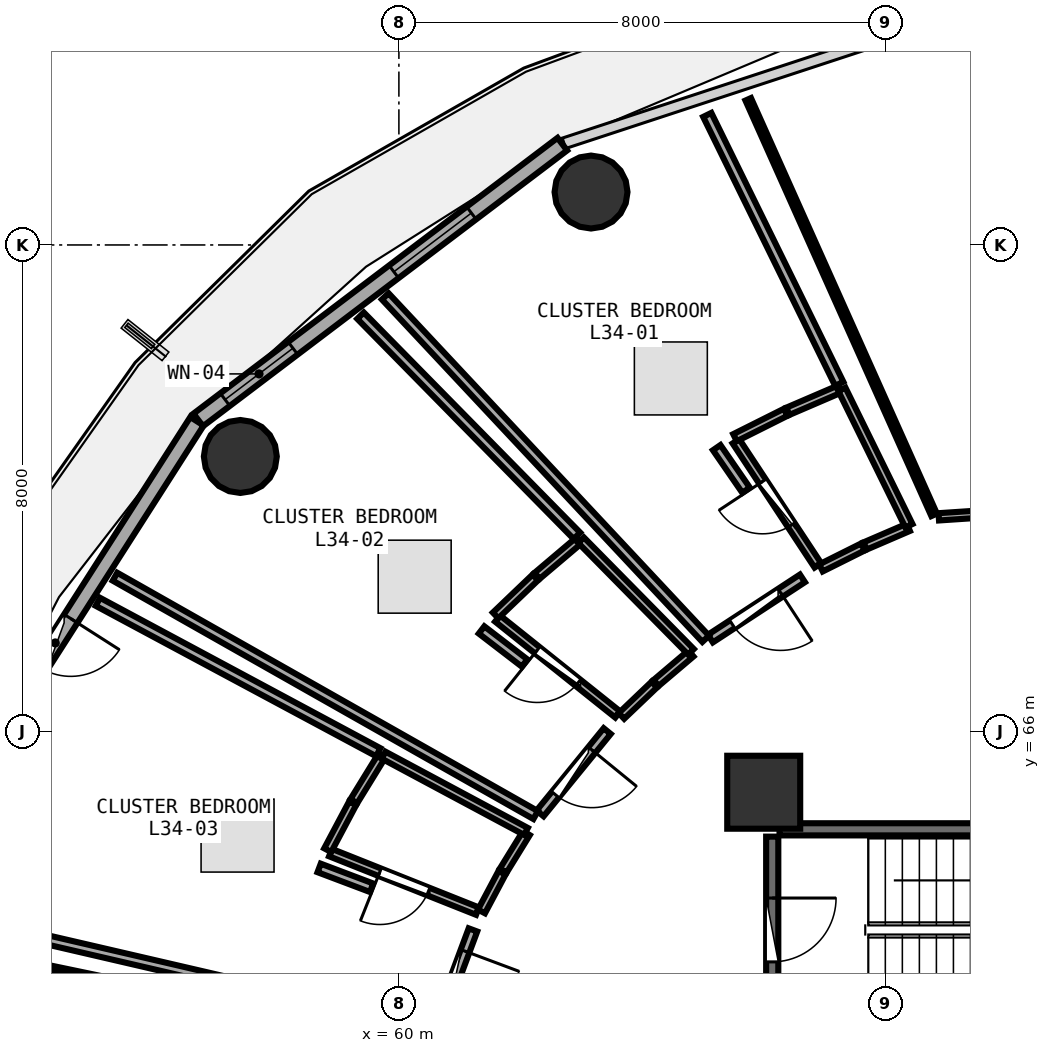
"""IFC4 building model, lengths in metres.
Left out: names, types, materials, properties, quantities, classifications, styles, units other than length and angle.
Written with IfcOpenShell. Run it as: python <this file> out.ifc"""

import sys

from ifc_helpers import new_model, si_unit, direction, frame, frame_2d, origin, origin_2d, place, context, subcontext, project, spatial, rectangle, circle, extrude, element, fill, save


model = new_model("IFC4")
c1 = context("Model", 3, precision=1e-05, world=origin(), true_north=direction((0.0, 1.0)))
c2 = subcontext(c1, "Body", "Model", "MODEL_VIEW")
j1 = project(units=[si_unit("LENGTHUNIT", "METRE"), si_unit("PLANEANGLEUNIT", "RADIAN")], contexts=[c1])
p1 = place(None, origin())
s1 = spatial("IfcSite", under=j1, at=p1, CompositionType="ELEMENT")
p2 = place(p1, origin())
s2 = spatial("IfcBuilding", under=s1, at=p2, CompositionType="ELEMENT")
p3 = place(p2, frame((0.0, 0.0, 135.6)))
s3 = spatial("IfcBuildingStorey", under=s2, at=p3, CompositionType="ELEMENT", Elevation=135.6)
p4 = place(p3, frame((66.0, 65.0, 0.0), z_axis=(0.0, 0.0, 1.0), x_axis=(1.0, 0.0, 0.0)))
e1 = element("IfcColumn", 1, at=p4, inside=s3, PredefinedType="PILASTER", context=c2, shape_type="SweptSolid", body=[
    extrude(rectangle(XDim=1.2, YDim=1.2, at=origin_2d()), origin(), (0.0, 0.0, 1.0), 3.75),
])
for number, where, z_axis, x_axis in (
    (2, (63.16, 74.87, 0.0), (0.0, 0.0, 1.0), (1.0, 0.0, 0.0)),
    (3, (57.392, 70.521, 0.0), (0.0, 0.0, 1.0), (1.0, 0.0, 0.0)),
):
    element("IfcColumn", number, at=place(p3, frame(where, z_axis=z_axis, x_axis=x_axis)), inside=s3, PredefinedType="COLUMN", context=c2, shape_type="SweptSolid", body=[
        extrude(circle(Radius=0.6, at=origin_2d()), origin(), (0.0, 0.0, 1.0), 3.75),
    ])
p5 = place(p3, frame((62.688, 75.658, 0.0), z_axis=(0.0, 0.0, 1.0), x_axis=(-0.797163719609, -0.603763202042, 0.0)))
e4 = element("IfcWall", 4, at=p5, inside=s3, PredefinedType="SOLIDWALL", context=c2, shape_type="SweptSolid", body=[
    extrude(rectangle(XDim=7.512, YDim=0.26, at=frame_2d((3.756, 0.0))), origin(), (0.0, 0.0, 1.0), 3.475),
])
p6 = place(p5, frame((1.876, 0.0, 0.85)))
e5 = element("IfcOpeningElement", 5, at=p6, cuts=e4, PredefinedType="OPENING", context=c2, shape_type="SweptSolid", body=[
    extrude(rectangle(XDim=1.6, YDim=1.45, at=frame_2d((0.8, 0.725))), frame((0.0, 0.14, 0.0), z_axis=(0.0, -1.0, 0.0), x_axis=(1.0, 0.0, 0.0)), (0.0, 0.0, 1.0), 0.28),
])
p7 = place(p5, frame((5.558, 0.0, 0.85)))
e6 = element("IfcOpeningElement", 6, at=p7, cuts=e4, PredefinedType="OPENING", context=c2, shape_type="SweptSolid", body=[
    extrude(rectangle(XDim=1.4, YDim=1.45, at=frame_2d((0.7, 0.725))), frame((0.0, 0.14, 0.0), z_axis=(0.0, -1.0, 0.0), x_axis=(1.0, 0.0, 0.0)), (0.0, 0.0, 1.0), 0.28),
])
p8 = place(p3, frame((56.679, 71.1, 0.0), z_axis=(0.0, 0.0, 1.0), x_axis=(-0.538801521808, -0.842432739213, 0.0)))
e7 = element("IfcWall", 7, at=p8, inside=s3, PredefinedType="SOLIDWALL", context=c2, shape_type="SweptSolid", body=[
    extrude(rectangle(XDim=7.253, YDim=0.26, at=frame_2d((3.627, 0.0))), origin(), (0.0, 0.0, 1.0), 3.475),
])
p9 = place(p8, frame((3.852, 0.0, 0.0)))
e8 = element("IfcOpeningElement", 8, at=p9, cuts=e7, PredefinedType="OPENING", context=c2, shape_type="SweptSolid", body=[
    extrude(rectangle(XDim=0.95, YDim=2.1, at=frame_2d((0.475, 1.05))), frame((0.0, 0.14, 0.0), z_axis=(0.0, -1.0, 0.0), x_axis=(1.0, 0.0, 0.0)), (0.0, 0.0, 1.0), 0.28),
])
p10 = place(p8, frame((5.152, 0.0, 0.85)))
e9 = element("IfcOpeningElement", 9, at=p10, cuts=e7, PredefinedType="OPENING", context=c2, shape_type="SweptSolid", body=[
    extrude(rectangle(XDim=1.2, YDim=1.45, at=frame_2d((0.6, 0.725))), frame((0.0, 0.14, 0.0), z_axis=(0.0, -1.0, 0.0), x_axis=(1.0, 0.0, 0.0)), (0.0, 0.0, 1.0), 0.28),
])
p11 = place(p3, frame((73.42, 64.39, 0.0), z_axis=(0.0, 0.0, 1.0), x_axis=(-1.0, 0.0, 0.0)))
e10 = element("IfcWall", 10, at=p11, inside=s3, PredefinedType="SHEAR", context=c2, shape_type="SweptSolid", body=[
    extrude(rectangle(XDim=7.16, YDim=0.2, at=frame_2d((3.58, 0.0))), origin(), (0.0, 0.0, 1.0), 3.49),
])
p12 = place(p3, frame((66.14, 64.27, 0.0), z_axis=(0.0, 0.0, 1.0), x_axis=(0.0, -1.0, 0.0)))
e11 = element("IfcWall", 11, at=p12, inside=s3, PredefinedType="SHEAR", context=c2, shape_type="SweptSolid", body=[
    extrude(rectangle(XDim=3.07, YDim=0.2, at=frame_2d((1.535, 0.0))), origin(), (0.0, 0.0, 1.0), 3.49),
])
p13 = place(p12, frame((1.01, 0.0, 0.0)))
e12 = element("IfcOpeningElement", 12, at=p13, cuts=e11, PredefinedType="OPENING", context=c2, shape_type="SweptSolid", body=[
    extrude(rectangle(XDim=1.05, YDim=2.1, at=frame_2d((0.525, 1.05))), frame((0.0, 0.11, 0.0), z_axis=(0.0, -1.0, 0.0), x_axis=(1.0, 0.0, 0.0)), (0.0, 0.0, 1.0), 0.22),
])
p14 = place(p3, frame((77.169, 70.083, 0.0), z_axis=(0.0, 0.0, 1.0), x_axis=(-0.997775005058, -0.066671127793, 0.0)))
e13 = element("IfcWall", 13, at=p14, inside=s3, PredefinedType="PARTITIONING", context=c2, shape_type="SweptSolid", body=[
    extrude(rectangle(XDim=8.309, YDim=0.12, at=frame_2d((4.154, 0.0))), origin(), (0.0, 0.0, 1.0), 2.975),
])
p15 = place(p14, frame((3.704, 0.0, 0.0)))
e14 = element("IfcOpeningElement", 14, at=p15, cuts=e13, PredefinedType="OPENING", context=c2, shape_type="SweptSolid", body=[
    extrude(rectangle(XDim=0.9, YDim=2.08, at=frame_2d((0.45, 1.04))), frame((0.0, 0.07, 0.0), z_axis=(0.0, -1.0, 0.0), x_axis=(1.0, 0.0, 0.0)), (0.0, 0.0, 1.0), 0.14),
])
p16 = place(p3, frame((66.891, 68.73, 0.0), z_axis=(0.0, 0.0, 1.0), x_axis=(-0.550825526042, 0.834620416633, 0.0)))
e15 = element("IfcWall", 15, at=p16, inside=s3, PredefinedType="PLUMBINGWALL", context=c2, shape_type="SweptSolid", body=[
    extrude(rectangle(XDim=2.447, YDim=0.13, at=frame_2d((1.223, 0.0))), origin(), (0.0, 0.0, 1.0), 3.235),
])
p17 = place(p16, frame((0.793, 0.0, 0.0)))
e16 = element("IfcOpeningElement", 16, at=p17, cuts=e15, PredefinedType="OPENING", context=c2, shape_type="SweptSolid", body=[
    extrude(rectangle(XDim=0.86, YDim=2.05, at=frame_2d((0.43, 1.025))), frame((0.0, 0.075, 0.0), z_axis=(0.0, -1.0, 0.0), x_axis=(1.0, 0.0, 0.0)), (0.0, 0.0, 1.0), 0.15),
])
p18 = place(p3, frame((66.637, 68.517, 0.0), z_axis=(0.0, 0.0, 1.0), x_axis=(-0.836795974783, -0.547514836864, 0.0)))
e17 = element("IfcWall", 17, at=p18, inside=s3, PredefinedType="PARTITIONING", context=c2, shape_type="SweptSolid", body=[
    extrude(rectangle(XDim=1.809, YDim=0.15, at=frame_2d((0.904, 0.0))), origin(), (0.0, 0.0, 1.0), 2.975),
])
p19 = place(p18, frame((0.429, 0.0, 0.0)))
e18 = element("IfcOpeningElement", 18, at=p19, cuts=e17, PredefinedType="OPENING", context=c2, shape_type="SweptSolid", body=[
    extrude(rectangle(XDim=0.95, YDim=2.08, at=frame_2d((0.475, 1.04))), frame((0.0, 0.085, 0.0), z_axis=(0.0, -1.0, 0.0), x_axis=(1.0, 0.0, 0.0)), (0.0, 0.0, 1.0), 0.17),
])
p20 = place(p3, frame((63.599, 66.278, 0.0), z_axis=(0.0, 0.0, 1.0), x_axis=(-0.781386491078, 0.624047395284, 0.0)))
e19 = element("IfcWall", 19, at=p20, inside=s3, PredefinedType="PLUMBINGWALL", context=c2, shape_type="SweptSolid", body=[
    extrude(rectangle(XDim=2.529, YDim=0.13, at=frame_2d((1.265, 0.0))), origin(), (0.0, 0.0, 1.0), 2.975),
])
p21 = place(p20, frame((0.835, 0.0, 0.0)))
e20 = element("IfcOpeningElement", 20, at=p21, cuts=e19, PredefinedType="OPENING", context=c2, shape_type="SweptSolid", body=[
    extrude(rectangle(XDim=0.86, YDim=2.05, at=frame_2d((0.43, 1.025))), frame((0.0, 0.075, 0.0), z_axis=(0.0, -1.0, 0.0), x_axis=(1.0, 0.0, 0.0)), (0.0, 0.0, 1.0), 0.15),
])
p22 = place(p3, frame((63.426, 66.006, 0.0), z_axis=(0.0, 0.0, 1.0), x_axis=(-0.63192798372, -0.775027111391, 0.0)))
e21 = element("IfcWall", 21, at=p22, inside=s3, PredefinedType="PARTITIONING", context=c2, shape_type="SweptSolid", body=[
    extrude(rectangle(XDim=1.747, YDim=0.15, at=frame_2d((0.874, 0.0))), origin(), (0.0, 0.0, 1.0), 2.975),
])
p23 = place(p22, frame((0.399, 0.0, 0.0)))
e22 = element("IfcOpeningElement", 22, at=p23, cuts=e21, PredefinedType="OPENING", context=c2, shape_type="SweptSolid", body=[
    extrude(rectangle(XDim=0.95, YDim=2.08, at=frame_2d((0.475, 1.04))), frame((0.0, 0.085, 0.0), z_axis=(0.0, -1.0, 0.0), x_axis=(1.0, 0.0, 0.0)), (0.0, 0.0, 1.0), 0.17),
])
p24 = place(p3, frame((61.293, 63.044, 0.0), z_axis=(0.0, 0.0, 1.0), x_axis=(-0.929051463741, 0.369950507123, 0.0)))
e23 = element("IfcWall", 23, at=p24, inside=s3, PredefinedType="PLUMBINGWALL", context=c2, shape_type="SweptSolid", body=[
    extrude(rectangle(XDim=2.602, YDim=0.13, at=frame_2d((1.301, 0.0))), origin(), (0.0, 0.0, 1.0), 3.235),
])
p25 = place(p24, frame((0.871, 0.0, 0.0)))
e24 = element("IfcOpeningElement", 24, at=p25, cuts=e23, PredefinedType="OPENING", context=c2, shape_type="SweptSolid", body=[
    extrude(rectangle(XDim=0.86, YDim=2.05, at=frame_2d((0.43, 1.025))), frame((0.0, 0.075, 0.0), z_axis=(0.0, -1.0, 0.0), x_axis=(1.0, 0.0, 0.0)), (0.0, 0.0, 1.0), 0.15),
])
p26 = place(p3, frame((61.218, 62.736, 0.0), z_axis=(0.0, 0.0, 1.0), x_axis=(-0.349718783302, -0.93685472332, 0.0)))
e25 = element("IfcWall", 25, at=p26, inside=s3, PredefinedType="PARTITIONING", context=c2, shape_type="SweptSolid", body=[
    extrude(rectangle(XDim=1.696, YDim=0.15, at=frame_2d((0.848, 0.0))), origin(), (0.0, 0.0, 1.0), 3.235),
])
p27 = place(p26, frame((0.373, 0.0, 0.0)))
e26 = element("IfcOpeningElement", 26, at=p27, cuts=e25, PredefinedType="OPENING", context=c2, shape_type="SweptSolid", body=[
    extrude(rectangle(XDim=0.95, YDim=2.08, at=frame_2d((0.475, 1.04))), frame((0.0, 0.085, 0.0), z_axis=(0.0, -1.0, 0.0), x_axis=(1.0, 0.0, 0.0)), (0.0, 0.0, 1.0), 0.17),
])
p28 = place(p3, frame((68.803, 69.562, 0.0), z_axis=(0.0, 0.0, 1.0), x_axis=(-0.408373210504, 0.912815052978, 0.0)))
e27 = element("IfcWall", 27, at=p28, inside=s3, PredefinedType="PARTITIONING", context=c2, shape_type="SweptSolid", body=[
    extrude(rectangle(XDim=7.487, YDim=0.1, at=frame_2d((3.743, 0.0))), origin(), (0.0, 0.0, 1.0), 3.025),
])
p29 = place(p3, frame((68.379, 69.356, 0.0), z_axis=(0.0, 0.0, 1.0), x_axis=(-0.918393228723, -0.395668898746, 0.0)))
e28 = element("IfcWall", 28, at=p29, inside=s3, PredefinedType="PLUMBINGWALL", context=c2, shape_type="SweptSolid", body=[
    extrude(rectangle(XDim=0.774, YDim=0.13, at=frame_2d((0.387, 0.0))), origin(), (0.0, 0.0, 1.0), 3.235),
])
p30 = place(p3, frame((67.631, 69.033, 0.0), z_axis=(0.0, 0.0, 1.0), x_axis=(-0.894617251975, -0.446833271443, 0.0)))
e29 = element("IfcWall", 29, at=p30, inside=s3, PredefinedType="PLUMBINGWALL", context=c2, shape_type="SweptSolid", body=[
    extrude(rectangle(XDim=0.771, YDim=0.13, at=frame_2d((0.385, 0.0))), origin(), (0.0, 0.0, 1.0), 3.235),
])
p31 = place(p3, frame((65.528, 70.831, 0.0), z_axis=(0.0, 0.0, 1.0), x_axis=(0.894269924497, 0.447527990343, 0.0)))
e30 = element("IfcWall", 30, at=p31, inside=s3, PredefinedType="PLUMBINGWALL", context=c2, shape_type="SweptSolid", body=[
    extrude(rectangle(XDim=0.932, YDim=0.13, at=frame_2d((0.466, 0.0))), origin(), (0.0, 0.0, 1.0), 3.175),
])
p32 = place(p3, frame((66.397, 71.265, 0.0), z_axis=(0.0, 0.0, 1.0), x_axis=(0.918726840833, 0.394893646357, 0.0)))
e31 = element("IfcWall", 31, at=p32, inside=s3, PredefinedType="PLUMBINGWALL", context=c2, shape_type="SweptSolid", body=[
    extrude(rectangle(XDim=0.937, YDim=0.13, at=frame_2d((0.469, 0.0))), origin(), (0.0, 0.0, 1.0), 3.175),
])
p33 = place(p3, frame((67.286, 71.625, 0.0), z_axis=(0.0, 0.0, 1.0), x_axis=(0.441029506653, -0.897492604015, 0.0)))
e32 = element("IfcWall", 32, at=p33, inside=s3, PredefinedType="PLUMBINGWALL", context=c2, shape_type="SweptSolid", body=[
    extrude(rectangle(XDim=2.499, YDim=0.13, at=frame_2d((1.25, 0.0))), origin(), (0.0, 0.0, 1.0), 3.175),
])
p34 = place(p3, frame((65.046, 67.523, 0.0), z_axis=(0.0, 0.0, 1.0), x_axis=(-0.683295427563, 0.730142012674, 0.0)))
e33 = element("IfcWall", 33, at=p34, inside=s3, PredefinedType="PARTITIONING", context=c2, shape_type="SweptSolid", body=[
    extrude(rectangle(XDim=7.713, YDim=0.15, at=frame_2d((3.856, 0.0))), origin(), (0.0, 0.0, 1.0), 3.025),
])
p35 = place(p3, frame((65.072, 76.139, 0.0), z_axis=(0.0, 0.0, 1.0), x_axis=(0.440581721025, -0.897712508044, 0.0)))
e34 = element("IfcWall", 34, at=p35, inside=s3, PredefinedType="PARTITIONING", context=c2, shape_type="SweptSolid", body=[
    extrude(rectangle(XDim=4.927, YDim=0.15, at=frame_2d((2.464, 0.0))), origin(), (0.0, 0.0, 1.0), 3.025),
])
p36 = place(p3, frame((65.227, 70.667, 0.0), z_axis=(0.0, 0.0, 1.0), x_axis=(0.567880544382, -0.823110981164, 0.0)))
e35 = element("IfcWall", 35, at=p36, inside=s3, PredefinedType="PARTITIONING", context=c2, shape_type="SweptSolid", body=[
    extrude(rectangle(XDim=0.85, YDim=0.15, at=frame_2d((0.425, 0.0))), origin(), (0.0, 0.0, 1.0), 3.48),
])
p37 = place(p3, frame((64.803, 67.282, 0.0), z_axis=(0.0, 0.0, 1.0), x_axis=(-0.762941836055, -0.646467133578, 0.0)))
e36 = element("IfcWall", 36, at=p37, inside=s3, PredefinedType="PLUMBINGWALL", context=c2, shape_type="SweptSolid", body=[
    extrude(rectangle(XDim=0.75, YDim=0.13, at=frame_2d((0.375, 0.0))), origin(), (0.0, 0.0, 1.0), 3.48),
])
p38 = place(p3, frame((64.2, 66.77, 0.0), z_axis=(0.0, 0.0, 1.0), x_axis=(-0.723429788657, -0.690397958343, 0.0)))
e37 = element("IfcWall", 37, at=p38, inside=s3, PredefinedType="PLUMBINGWALL", context=c2, shape_type="SweptSolid", body=[
    extrude(rectangle(XDim=0.747, YDim=0.13, at=frame_2d((0.373, 0.0))), origin(), (0.0, 0.0, 1.0), 2.975),
])
p39 = place(p3, frame((61.591, 67.908, 0.0), z_axis=(0.0, 0.0, 1.0), x_axis=(0.722606643047, 0.691259458831, 0.0)))
e38 = element("IfcWall", 38, at=p39, inside=s3, PredefinedType="PLUMBINGWALL", context=c2, shape_type="SweptSolid", body=[
    extrude(rectangle(XDim=0.903, YDim=0.13, at=frame_2d((0.452, 0.0))), origin(), (0.0, 0.0, 1.0), 2.975),
])
p40 = place(p3, frame((62.273, 68.559, 0.0), z_axis=(0.0, 0.0, 1.0), x_axis=(0.763243602663, 0.646110828724, 0.0)))
e39 = element("IfcWall", 39, at=p40, inside=s3, PredefinedType="PLUMBINGWALL", context=c2, shape_type="SweptSolid", body=[
    extrude(rectangle(XDim=0.909, YDim=0.13, at=frame_2d((0.454, 0.0))), origin(), (0.0, 0.0, 1.0), 3.48),
])
p41 = place(p3, frame((62.996, 69.145, 0.0), z_axis=(0.0, 0.0, 1.0), x_axis=(0.701684931383, -0.712487373271, 0.0)))
e40 = element("IfcWall", 40, at=p41, inside=s3, PredefinedType="PLUMBINGWALL", context=c2, shape_type="SweptSolid", body=[
    extrude(rectangle(XDim=2.576, YDim=0.13, at=frame_2d((1.288, 0.0))), origin(), (0.0, 0.0, 1.0), 3.235),
])
p42 = place(p3, frame((62.249, 64.625, 0.0), z_axis=(0.0, 0.0, 1.0), x_axis=(-0.870077493263, 0.492914957896, 0.0)))
e41 = element("IfcWall", 41, at=p42, inside=s3, PredefinedType="PARTITIONING", context=c2, shape_type="SweptSolid", body=[
    extrude(rectangle(XDim=7.952, YDim=0.15, at=frame_2d((3.976, 0.0))), origin(), (0.0, 0.0, 1.0), 2.975),
])
p43 = place(p3, frame((59.369, 72.837, 0.0), z_axis=(0.0, 0.0, 1.0), x_axis=(0.701093902079, -0.713068959125, 0.0)))
e42 = element("IfcWall", 42, at=p43, inside=s3, PredefinedType="PARTITIONING", context=c2, shape_type="SweptSolid", body=[
    extrude(rectangle(XDim=5.076, YDim=0.15, at=frame_2d((2.538, 0.0))), origin(), (0.0, 0.0, 1.0), 3.025),
])
p44 = place(p3, frame((61.36, 67.669, 0.0), z_axis=(0.0, 0.0, 1.0), x_axis=(0.793020417561, -0.609195056884, 0.0)))
e43 = element("IfcWall", 43, at=p44, inside=s3, PredefinedType="PARTITIONING", context=c2, shape_type="SweptSolid", body=[
    extrude(rectangle(XDim=0.893, YDim=0.15, at=frame_2d((0.446, 0.0))), origin(), (0.0, 0.0, 1.0), 3.48),
])
p45 = place(p3, frame((62.097, 64.329, 0.0), z_axis=(0.0, 0.0, 1.0), x_axis=(-0.524547607878, -0.851381117402, 0.0)))
e44 = element("IfcWall", 44, at=p45, inside=s3, PredefinedType="PLUMBINGWALL", context=c2, shape_type="SweptSolid", body=[
    extrude(rectangle(XDim=0.726, YDim=0.13, at=frame_2d((0.363, 0.0))), origin(), (0.0, 0.0, 1.0), 3.48),
])
p46 = place(p3, frame((61.697, 63.676, 0.0), z_axis=(0.0, 0.0, 1.0), x_axis=(-0.469163481751, -0.88311133352, 0.0)))
e45 = element("IfcWall", 45, at=p46, inside=s3, PredefinedType="PLUMBINGWALL", context=c2, shape_type="SweptSolid", body=[
    extrude(rectangle(XDim=0.721, YDim=0.13, at=frame_2d((0.36, 0.0))), origin(), (0.0, 0.0, 1.0), 3.48),
])
p47 = place(p3, frame((58.829, 64.047, 0.0), z_axis=(0.0, 0.0, 1.0), x_axis=(0.469311809042, 0.883032516895, 0.0)))
e46 = element("IfcWall", 46, at=p47, inside=s3, PredefinedType="PLUMBINGWALL", context=c2, shape_type="SweptSolid", body=[
    extrude(rectangle(XDim=0.874, YDim=0.13, at=frame_2d((0.437, 0.0))), origin(), (0.0, 0.0, 1.0), 2.975),
])
p48 = place(p3, frame((59.26, 64.853, 0.0), z_axis=(0.0, 0.0, 1.0), x_axis=(0.524097425664, 0.851658316705, 0.0)))
e47 = element("IfcWall", 47, at=p48, inside=s3, PredefinedType="PLUMBINGWALL", context=c2, shape_type="SweptSolid", body=[
    extrude(rectangle(XDim=0.879, YDim=0.13, at=frame_2d((0.44, 0.0))), origin(), (0.0, 0.0, 1.0), 2.975),
])
p49 = place(p3, frame((59.749, 65.61, 0.0), z_axis=(0.0, 0.0, 1.0), x_axis=(0.881540078275, -0.472109193296, 0.0)))
e48 = element("IfcWall", 48, at=p49, inside=s3, PredefinedType="PLUMBINGWALL", context=c2, shape_type="SweptSolid", body=[
    extrude(rectangle(XDim=2.656, YDim=0.13, at=frame_2d((1.328, 0.0))), origin(), (0.0, 0.0, 1.0), 2.975),
])
p50 = place(p3, frame((60.565, 61.1, 0.0), z_axis=(0.0, 0.0, 1.0), x_axis=(-0.97414388338, 0.225928516292, 0.0)))
e49 = element("IfcWall", 49, at=p50, inside=s3, PredefinedType="PARTITIONING", context=c2, shape_type="SweptSolid", body=[
    extrude(rectangle(XDim=8.122, YDim=0.15, at=frame_2d((4.061, 0.0))), origin(), (0.0, 0.0, 1.0), 3.025),
])
p51 = place(p3, frame((55.049, 68.131, 0.0), z_axis=(0.0, 0.0, 1.0), x_axis=(0.881257916537, -0.472635678447, 0.0)))
e50 = element("IfcWall", 50, at=p51, inside=s3, PredefinedType="PARTITIONING", context=c2, shape_type="SweptSolid", body=[
    extrude(rectangle(XDim=5.233, YDim=0.15, at=frame_2d((2.616, 0.0))), origin(), (0.0, 0.0, 1.0), 3.025),
])
p52 = place(p3, frame((58.688, 63.755, 0.0), z_axis=(0.0, 0.0, 1.0), x_axis=(0.935532386314, -0.353240929336, 0.0)))
e51 = element("IfcWall", 51, at=p52, inside=s3, PredefinedType="PARTITIONING", context=c2, shape_type="SweptSolid", body=[
    extrude(rectangle(XDim=0.922, YDim=0.15, at=frame_2d((0.461, 0.0))), origin(), (0.0, 0.0, 1.0), 3.48),
])
p53 = place(p3, frame((52.525, 62.464, 0.0), z_axis=(0.0, 0.0, 1.0), x_axis=(0.978946183013, -0.204118521367, 0.0)))
e52 = element("IfcWall", 52, at=p53, inside=s3, PredefinedType="PARTITIONING", context=c2, shape_type="SweptSolid", body=[
    extrude(rectangle(XDim=8.131, YDim=0.1, at=frame_2d((4.065, 0.0))), origin(), (0.0, 0.0, 1.0), 3.025),
])
p54 = place(p6, origin())
e53 = element("IfcWindow", 53, at=p54, inside=s3, PartitioningType="SINGLE_PANEL", PredefinedType="WINDOW", context=c2, shape_type="SweptSolid", body=[
    extrude(rectangle(XDim=1.6, YDim=1.45, at=frame_2d((0.8, 0.725))), frame((0.0, 0.03, 0.0), z_axis=(0.0, -1.0, 0.0), x_axis=(1.0, 0.0, 0.0)), (0.0, 0.0, 1.0), 0.06),
])
fill(e5, e53)
p55 = place(p9, frame((0.95, 0.0, 0.0), z_axis=(0.0, 0.0, 1.0), x_axis=(-1.0, 0.0, 0.0)))
e54 = element("IfcDoor", 54, at=p55, inside=s3, OperationType="SINGLE_SWING_RIGHT", PredefinedType="DOOR", context=c2, shape_type="SweptSolid", body=[
    extrude(rectangle(XDim=0.95, YDim=2.1, at=frame_2d((0.475, 1.05))), frame((0.0, 0.025, 0.0), z_axis=(0.0, -1.0, 0.0), x_axis=(1.0, 0.0, 0.0)), (0.0, 0.0, 1.0), 0.05),
])
fill(e8, e54)
p56 = place(p7, origin())
e55 = element("IfcWindow", 55, at=p56, inside=s3, PartitioningType="SINGLE_PANEL", PredefinedType="WINDOW", context=c2, shape_type="SweptSolid", body=[
    extrude(rectangle(XDim=1.4, YDim=1.45, at=frame_2d((0.7, 0.725))), frame((0.0, 0.03, 0.0), z_axis=(0.0, -1.0, 0.0), x_axis=(1.0, 0.0, 0.0)), (0.0, 0.0, 1.0), 0.06),
])
fill(e6, e55)
p57 = place(p13, origin())
e56 = element("IfcDoor", 56, at=p57, inside=s3, OperationType="SINGLE_SWING_LEFT", PredefinedType="DOOR", context=c2, shape_type="SweptSolid", body=[
    extrude(rectangle(XDim=1.05, YDim=2.1, at=frame_2d((0.525, 1.05))), frame((0.0, 0.025, 0.0), z_axis=(0.0, -1.0, 0.0), x_axis=(1.0, 0.0, 0.0)), (0.0, 0.0, 1.0), 0.05),
])
fill(e12, e56)
p58 = place(p17, origin())
e57 = element("IfcDoor", 57, at=p58, inside=s3, OperationType="SINGLE_SWING_RIGHT", PredefinedType="DOOR", context=c2, shape_type="SweptSolid", body=[
    extrude(rectangle(XDim=0.86, YDim=2.05, at=frame_2d((0.43, 1.025))), frame((0.0, 0.025, 0.0), z_axis=(0.0, -1.0, 0.0), x_axis=(1.0, 0.0, 0.0)), (0.0, 0.0, 1.0), 0.05),
])
fill(e16, e57)
p59 = place(p19, origin())
e58 = element("IfcDoor", 58, at=p59, inside=s3, OperationType="SINGLE_SWING_LEFT", PredefinedType="DOOR", context=c2, shape_type="SweptSolid", body=[
    extrude(rectangle(XDim=0.95, YDim=2.08, at=frame_2d((0.475, 1.04))), frame((0.0, 0.025, 0.0), z_axis=(0.0, -1.0, 0.0), x_axis=(1.0, 0.0, 0.0)), (0.0, 0.0, 1.0), 0.05),
])
fill(e18, e58)
p60 = place(p21, origin())
e59 = element("IfcDoor", 59, at=p60, inside=s3, OperationType="SINGLE_SWING_RIGHT", PredefinedType="DOOR", context=c2, shape_type="SweptSolid", body=[
    extrude(rectangle(XDim=0.86, YDim=2.05, at=frame_2d((0.43, 1.025))), frame((0.0, 0.025, 0.0), z_axis=(0.0, -1.0, 0.0), x_axis=(1.0, 0.0, 0.0)), (0.0, 0.0, 1.0), 0.05),
])
fill(e20, e59)
p61 = place(p23, origin())
e60 = element("IfcDoor", 60, at=p61, inside=s3, OperationType="SINGLE_SWING_LEFT", PredefinedType="DOOR", context=c2, shape_type="SweptSolid", body=[
    extrude(rectangle(XDim=0.95, YDim=2.08, at=frame_2d((0.475, 1.04))), frame((0.0, 0.025, 0.0), z_axis=(0.0, -1.0, 0.0), x_axis=(1.0, 0.0, 0.0)), (0.0, 0.0, 1.0), 0.05),
])
fill(e22, e60)
p62 = place(p25, origin())
e61 = element("IfcDoor", 61, at=p62, inside=s3, OperationType="SINGLE_SWING_RIGHT", PredefinedType="DOOR", context=c2, shape_type="SweptSolid", body=[
    extrude(rectangle(XDim=0.86, YDim=2.05, at=frame_2d((0.43, 1.025))), frame((0.0, 0.025, 0.0), z_axis=(0.0, -1.0, 0.0), x_axis=(1.0, 0.0, 0.0)), (0.0, 0.0, 1.0), 0.05),
])
fill(e24, e61)
p63 = place(p27, origin())
e62 = element("IfcDoor", 62, at=p63, inside=s3, OperationType="SINGLE_SWING_LEFT", PredefinedType="DOOR", context=c2, shape_type="SweptSolid", body=[
    extrude(rectangle(XDim=0.95, YDim=2.08, at=frame_2d((0.475, 1.04))), frame((0.0, 0.025, 0.0), z_axis=(0.0, -1.0, 0.0), x_axis=(1.0, 0.0, 0.0)), (0.0, 0.0, 1.0), 0.05),
])
fill(e26, e62)
save(model, sys.argv[1])
